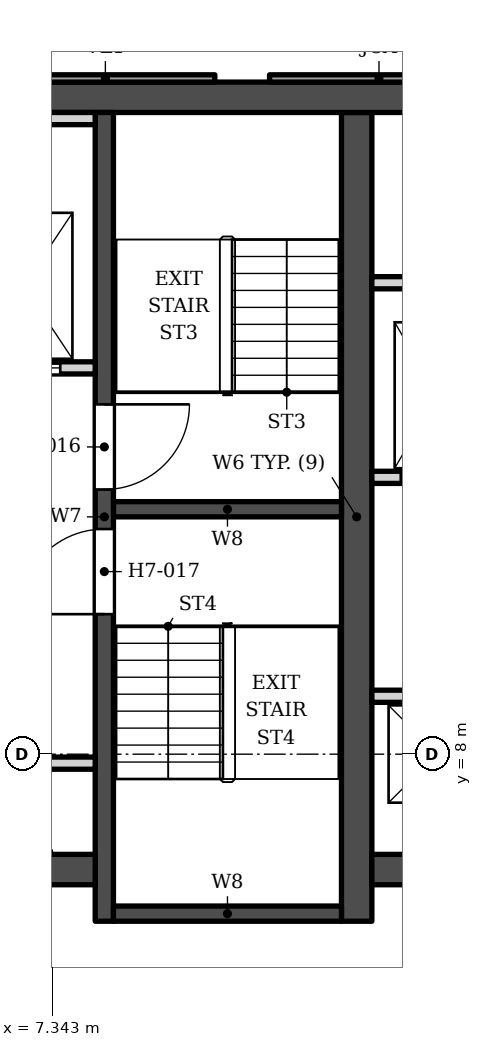
"""IFC4 building model, lengths in metres.
Left out: names, types, materials, properties, quantities, classifications, styles, units other than length and angle.
Written with IfcOpenShell. Run it as: python <this file> out.ifc"""

import sys

from ifc_helpers import new_model, si_unit, direction, frame, frame_2d, origin, place, context, subcontext, project, spatial, polyline, rectangle, outline, extrude, element, fill, save


model = new_model("IFC4")
c1 = context("Model", 3, precision=1e-05, world=origin(), true_north=direction((0.0, 1.0)))
c2 = subcontext(c1, "Body", "Model", "MODEL_VIEW")
j1 = project(units=[si_unit("LENGTHUNIT", "METRE"), si_unit("PLANEANGLEUNIT", "RADIAN")], contexts=[c1])
p1 = place(None, origin())
s1 = spatial("IfcSite", under=j1, at=p1, CompositionType="ELEMENT")
p2 = place(p1, origin())
s2 = spatial("IfcBuilding", under=s1, at=p2, CompositionType="ELEMENT")
p3 = place(p2, frame((0.0, 0.0, 112.2)))
s3 = spatial("IfcBuildingStorey", under=s2, at=p3, CompositionType="ELEMENT", Elevation=112.2)
p4 = place(p3, frame((-16.9, 18.802, 0.0), z_axis=(0.0, 0.0, 1.0), x_axis=(1.0, 0.0, 0.0)))
e1 = element("IfcWall", 1, at=p4, inside=s3, PredefinedType="SHEAR", context=c2, shape_type="SweptSolid", body=[
    extrude(rectangle(XDim=33.8, YDim=0.5, at=frame_2d((16.9, 0.0))), origin(), (0.0, 0.0, 1.0), 3.4),
])
p5 = place(p3, frame((12.35, 5.253, 0.0), z_axis=(0.0, 0.0, 1.0), x_axis=(0.0, 1.0, 0.0)))
e2 = element("IfcWall", 2, at=p5, inside=s3, PredefinedType="SHEAR", context=c2, shape_type="SweptSolid", body=[
    extrude(rectangle(XDim=13.3, YDim=0.5, at=frame_2d((6.65, 0.0))), origin(), (0.0, 0.0, 1.0), 3.4),
])
p6 = place(p3, frame((8.2, 5.253, 0.0), z_axis=(0.0, 0.0, 1.0), x_axis=(0.0, 1.0, 0.0)))
e3 = element("IfcWall", 3, at=p6, inside=s3, PredefinedType="SHEAR", context=c2, shape_type="SweptSolid", body=[
    extrude(rectangle(XDim=13.3, YDim=0.3, at=frame_2d((6.65, 0.0))), origin(), (0.0, 0.0, 1.0), 3.4),
])
p7 = place(p6, frame((7.1, 0.0, 0.0)))
e4 = element("IfcOpeningElement", 4, at=p7, cuts=e3, PredefinedType="OPENING", context=c2, shape_type="SweptSolid", body=[
    extrude(rectangle(XDim=1.4, YDim=2.1, at=frame_2d((0.7, 1.05))), frame((0.0, 0.16, 0.0), z_axis=(0.0, -1.0, 0.0), x_axis=(1.0, 0.0, 0.0)), (0.0, 0.0, 1.0), 0.32),
])
p8 = place(p6, frame((5.05, 0.0, 0.0)))
e5 = element("IfcOpeningElement", 5, at=p8, cuts=e3, PredefinedType="OPENING", context=c2, shape_type="SweptSolid", body=[
    extrude(rectangle(XDim=1.4, YDim=2.1, at=frame_2d((0.7, 1.05))), frame((0.0, 0.16, 0.0), z_axis=(0.0, -1.0, 0.0), x_axis=(1.0, 0.0, 0.0)), (0.0, 0.0, 1.0), 0.32),
])
for number, where, z_axis, x_axis in (
    (6, (8.35, 12.028, 0.0), (0.0, 0.0, 1.0), (1.0, 0.0, 0.0)),
    (7, (8.35, 5.378, 0.0), (0.0, 0.0, 1.0), (1.0, 0.0, 0.0)),
):
    element("IfcWall", number, at=place(p3, frame(where, z_axis=z_axis, x_axis=x_axis)), inside=s3, PredefinedType="SHEAR", context=c2, shape_type="SweptSolid", body=[
        extrude(rectangle(XDim=3.75, YDim=0.25, at=frame_2d((1.875, 0.0))), origin(), (0.0, 0.0, 1.0), 3.4),
    ])
p9 = place(p3, frame((1.0, 6.103, 0.0), z_axis=(0.0, 0.0, 1.0), x_axis=(1.0, 0.0, 0.0)))
e8 = element("IfcWall", 8, at=p9, inside=s3, PredefinedType="SHEAR", context=c2, shape_type="SweptSolid", body=[
    extrude(rectangle(XDim=7.05, YDim=0.5, at=frame_2d((3.525, 0.0))), origin(), (0.0, 0.0, 1.0), 3.4),
])
p10 = place(p9, frame((5.325, 0.0, 0.0)))
e9 = element("IfcOpeningElement", 9, at=p10, cuts=e8, PredefinedType="OPENING", context=c2, shape_type="SweptSolid", body=[
    extrude(rectangle(XDim=0.9, YDim=2.1, at=frame_2d((0.45, 1.05))), frame((0.0, 0.26, 0.0), z_axis=(0.0, -1.0, 0.0), x_axis=(1.0, 0.0, 0.0)), (0.0, 0.0, 1.0), 0.52),
])
p11 = place(p3, frame((12.6, 6.103, 0.0), z_axis=(0.0, 0.0, 1.0), x_axis=(1.0, 0.0, 0.0)))
e10 = element("IfcWall", 10, at=p11, inside=s3, PredefinedType="SHEAR", context=c2, shape_type="SweptSolid", body=[
    extrude(rectangle(XDim=4.3, YDim=0.5, at=frame_2d((2.15, 0.0))), origin(), (0.0, 0.0, 1.0), 3.4),
])
p12 = place(p3, origin())
e11 = element("IfcWall", 11, at=p12, inside=s3, PredefinedType="SOLIDWALL", context=c2, shape_type="SweptSolid", body=[
    extrude(outline(polyline([(10.917, 19.173), (10.917, 19.052), (14.517, 19.052), (14.517, 19.173), (10.917, 19.173)])), origin(), (0.0, 0.0, 1.0), 2.65),
])
p13 = place(p3, origin())
e12 = element("IfcWall", 12, at=p13, inside=s3, PredefinedType="ELEMENTEDWALL", context=c2, shape_type="SweptSolid", body=[
    extrude(outline(polyline([(6.417, 19.173), (6.417, 19.052), (10.017, 19.052), (10.017, 19.173), (6.417, 19.173)])), origin(), (0.0, 0.0, 1.0), 2.65),
])
p14 = place(p3, frame((5.55, 7.853, 0.0), z_axis=(0.0, 0.0, 1.0), x_axis=(1.0, 0.0, 0.0)))
e13 = element("IfcWall", 13, at=p14, inside=s3, PredefinedType="SOLIDWALL", context=c2, shape_type="SweptSolid", body=[
    extrude(rectangle(XDim=2.5, YDim=0.2, at=frame_2d((1.25, 0.0))), origin(), (0.0, 0.0, 1.0), 3.23),
])
p15 = place(p3, frame((12.6, 8.953, 0.0), z_axis=(0.0, 0.0, 1.0), x_axis=(1.0, 0.0, 0.0)))
e14 = element("IfcWall", 14, at=p15, inside=s3, PredefinedType="SOLIDWALL", context=c2, shape_type="SweptSolid", body=[
    extrude(rectangle(XDim=4.3, YDim=0.2, at=frame_2d((2.15, 0.0))), origin(), (0.0, 0.0, 1.0), 3.23),
])
p16 = place(p15, frame((0.525, 0.0, 0.0)))
e15 = element("IfcOpeningElement", 15, at=p16, cuts=e14, PredefinedType="OPENING", context=c2, shape_type="SweptSolid", body=[
    extrude(rectangle(XDim=1.1, YDim=2.1, at=frame_2d((0.55, 1.05))), frame((0.0, 0.11, 0.0), z_axis=(0.0, -1.0, 0.0), x_axis=(1.0, 0.0, 0.0)), (0.0, 0.0, 1.0), 0.22),
])
p17 = place(p15, frame((2.775, 0.0, 0.0)))
e16 = element("IfcOpeningElement", 16, at=p17, cuts=e14, PredefinedType="OPENING", context=c2, shape_type="SweptSolid", body=[
    extrude(rectangle(XDim=1.1, YDim=2.1, at=frame_2d((0.55, 1.05))), frame((0.0, 0.11, 0.0), z_axis=(0.0, -1.0, 0.0), x_axis=(1.0, 0.0, 0.0)), (0.0, 0.0, 1.0), 0.22),
])
p18 = place(p3, frame((12.6, 12.552, 0.0), z_axis=(0.0, 0.0, 1.0), x_axis=(1.0, 0.0, 0.0)))
e17 = element("IfcWall", 17, at=p18, inside=s3, PredefinedType="SOLIDWALL", context=c2, shape_type="SweptSolid", body=[
    extrude(rectangle(XDim=4.3, YDim=0.2, at=frame_2d((2.15, 0.0))), origin(), (0.0, 0.0, 1.0), 3.23),
])
p19 = place(p18, frame((0.475, 0.0, 0.0)))
e18 = element("IfcOpeningElement", 18, at=p19, cuts=e17, PredefinedType="OPENING", context=c2, shape_type="SweptSolid", body=[
    extrude(rectangle(XDim=1.2, YDim=2.1, at=frame_2d((0.6, 1.05))), frame((0.0, 0.11, 0.0), z_axis=(0.0, -1.0, 0.0), x_axis=(1.0, 0.0, 0.0)), (0.0, 0.0, 1.0), 0.22),
])
p20 = place(p18, frame((2.625, 0.0, 0.0)))
e19 = element("IfcOpeningElement", 19, at=p20, cuts=e17, PredefinedType="OPENING", context=c2, shape_type="SweptSolid", body=[
    extrude(rectangle(XDim=1.4, YDim=2.1, at=frame_2d((0.7, 1.05))), frame((0.0, 0.11, 0.0), z_axis=(0.0, -1.0, 0.0), x_axis=(1.0, 0.0, 0.0)), (0.0, 0.0, 1.0), 0.22),
])
p21 = place(p3, frame((5.3, 14.353, 0.0), z_axis=(0.0, 0.0, 1.0), x_axis=(1.0, 0.0, 0.0)))
e20 = element("IfcWall", 20, at=p21, inside=s3, PredefinedType="SOLIDWALL", context=c2, shape_type="SweptSolid", body=[
    extrude(rectangle(XDim=2.75, YDim=0.2, at=frame_2d((1.375, 0.0))), origin(), (0.0, 0.0, 1.0), 3.23),
])
p22 = place(p21, frame((0.975, 0.0, 0.0)))
e21 = element("IfcOpeningElement", 21, at=p22, cuts=e20, PredefinedType="OPENING", context=c2, shape_type="SweptSolid", body=[
    extrude(rectangle(XDim=1.2, YDim=2.1, at=frame_2d((0.6, 1.05))), frame((0.0, 0.11, 0.0), z_axis=(0.0, -1.0, 0.0), x_axis=(1.0, 0.0, 0.0)), (0.0, 0.0, 1.0), 0.22),
])
p23 = place(p3, frame((12.6, 15.753, 0.0), z_axis=(0.0, 0.0, 1.0), x_axis=(1.0, 0.0, 0.0)))
e22 = element("IfcWall", 22, at=p23, inside=s3, PredefinedType="SOLIDWALL", context=c2, shape_type="SweptSolid", body=[
    extrude(rectangle(XDim=4.3, YDim=0.2, at=frame_2d((2.15, 0.0))), origin(), (0.0, 0.0, 1.0), 3.23),
])
p24 = place(p3, frame((5.5, 18.453, 0.0), z_axis=(0.0, 0.0, 1.0), x_axis=(1.0, 0.0, 0.0)))
e23 = element("IfcWall", 23, at=p24, inside=s3, PredefinedType="SOLIDWALL", context=c2, shape_type="SweptSolid", body=[
    extrude(rectangle(XDim=2.55, YDim=0.2, at=frame_2d((1.275, 0.0))), origin(), (0.0, 0.0, 1.0), 3.23),
])
p25 = place(p22, origin())
e24 = element("IfcDoor", 24, at=p25, inside=s3, OperationType="DOUBLE_DOOR_SLIDING", PredefinedType="DOOR", context=c2, shape_type="SweptSolid", body=[
    extrude(rectangle(XDim=1.2, YDim=2.1, at=frame_2d((0.6, 1.05))), frame((0.0, 0.025, 0.0), z_axis=(0.0, -1.0, 0.0), x_axis=(1.0, 0.0, 0.0)), (0.0, 0.0, 1.0), 0.05),
])
fill(e21, e24)
p26 = place(p19, origin())
e25 = element("IfcDoor", 25, at=p26, inside=s3, OperationType="DOUBLE_DOOR_SLIDING", PredefinedType="DOOR", context=c2, shape_type="SweptSolid", body=[
    extrude(rectangle(XDim=1.2, YDim=2.1, at=frame_2d((0.6, 1.05))), frame((0.0, 0.025, 0.0), z_axis=(0.0, -1.0, 0.0), x_axis=(1.0, 0.0, 0.0)), (0.0, 0.0, 1.0), 0.05),
])
fill(e18, e25)
p27 = place(p7, origin())
e26 = element("IfcDoor", 26, at=p27, inside=s3, OperationType="SINGLE_SWING_RIGHT", PredefinedType="DOOR", context=c2, shape_type="SweptSolid", body=[
    extrude(rectangle(XDim=1.4, YDim=2.1, at=frame_2d((0.7, 1.05))), frame((0.0, 0.025, 0.0), z_axis=(0.0, -1.0, 0.0), x_axis=(1.0, 0.0, 0.0)), (0.0, 0.0, 1.0), 0.05),
])
fill(e4, e26)
p28 = place(p8, origin())
e27 = element("IfcDoor", 27, at=p28, inside=s3, OperationType="SINGLE_SWING_LEFT", PredefinedType="DOOR", context=c2, shape_type="SweptSolid", body=[
    extrude(rectangle(XDim=1.4, YDim=2.1, at=frame_2d((0.7, 1.05))), frame((0.0, 0.025, 0.0), z_axis=(0.0, -1.0, 0.0), x_axis=(1.0, 0.0, 0.0)), (0.0, 0.0, 1.0), 0.05),
])
fill(e5, e27)
save(model, sys.argv[1])
